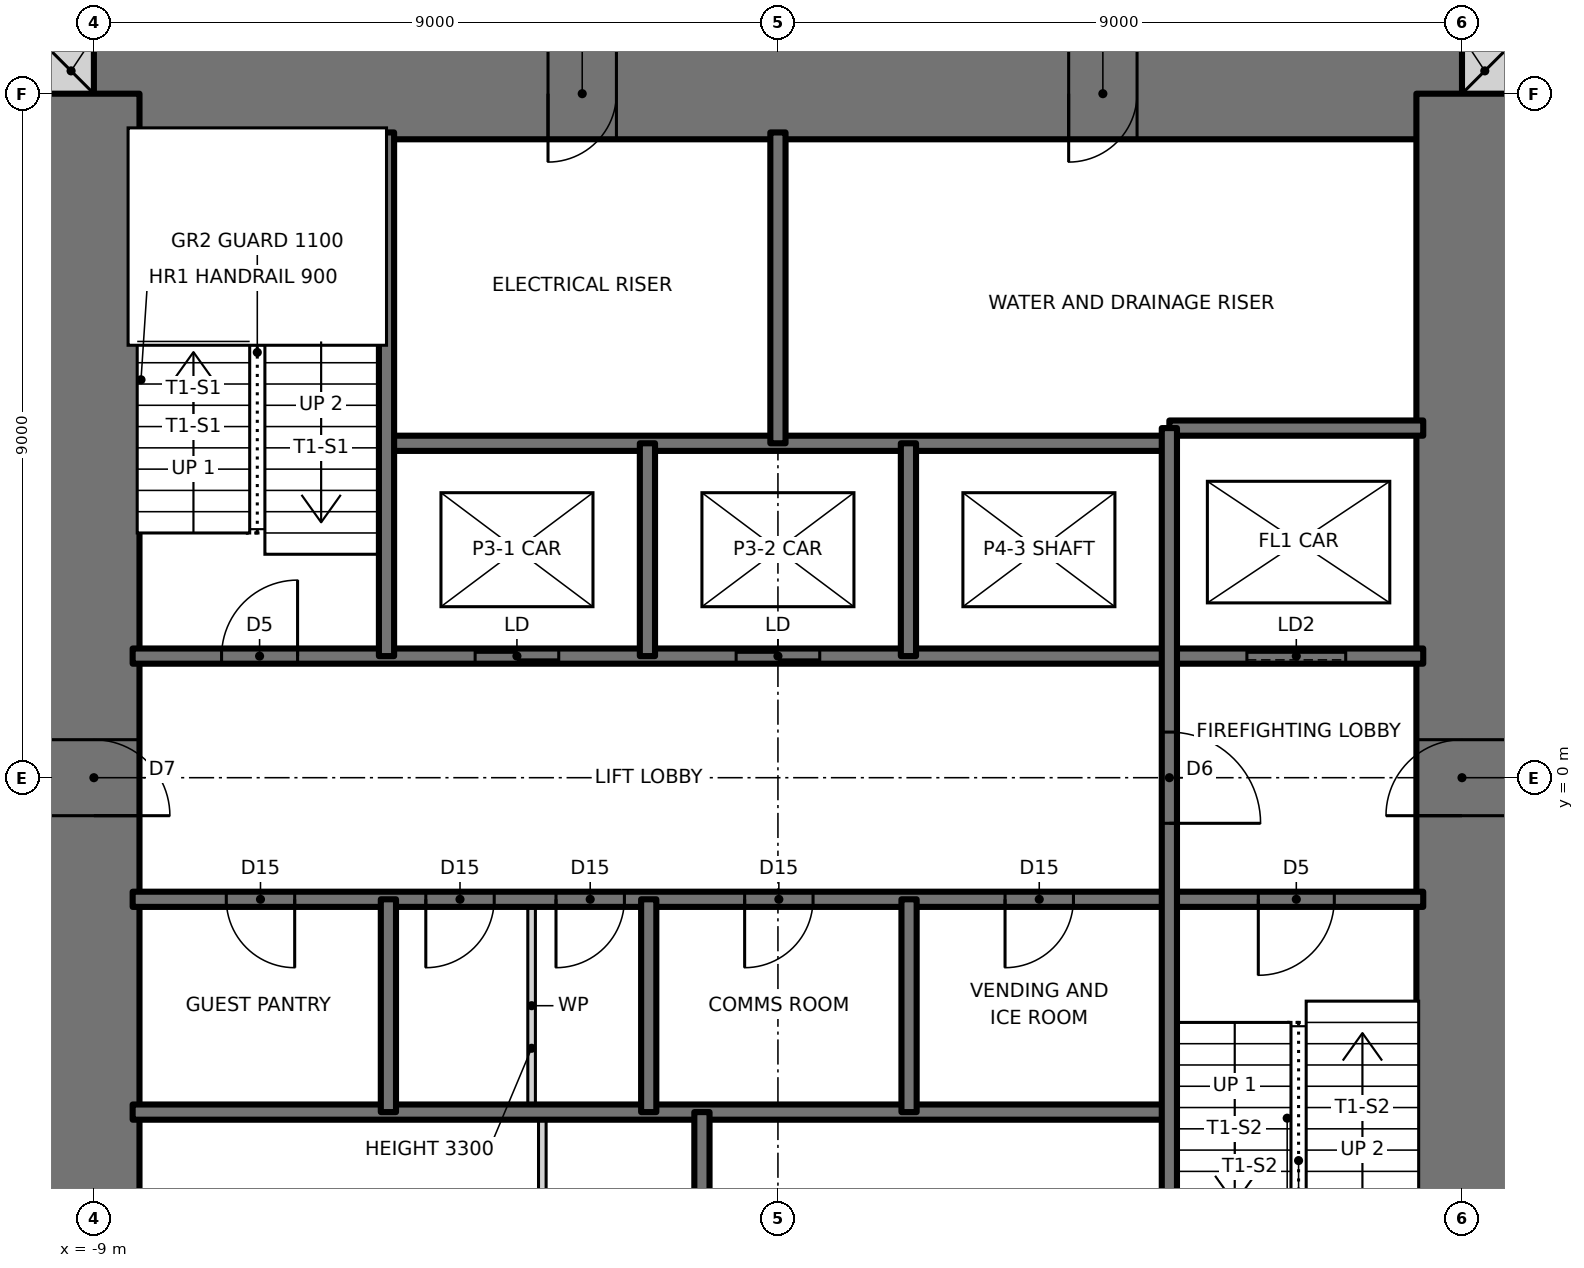
"""IFC4 building model, lengths in metres.
Left out: names, types, materials, properties, quantities, classifications, styles, units other than length and angle.
Written with IfcOpenShell. Run it as: python <this file> out.ifc"""

import sys

from ifc_helpers import new_model, si_unit, direction, frame, frame_2d, origin, place, context, subcontext, project, spatial, rectangle, extrude, element, fill, save


model = new_model("IFC4")
c1 = context("Model", 3, precision=1e-05, world=origin(), true_north=direction((0.0, 1.0)))
c2 = subcontext(c1, "Body", "Model", "MODEL_VIEW")
j1 = project(units=[si_unit("LENGTHUNIT", "METRE"), si_unit("PLANEANGLEUNIT", "RADIAN")], contexts=[c1])
p1 = place(None, origin())
s1 = spatial("IfcSite", under=j1, at=p1, CompositionType="ELEMENT")
p2 = place(p1, origin())
s2 = spatial("IfcBuilding", under=s1, at=p2, CompositionType="ELEMENT")
p3 = place(p2, frame((0.0, 0.0, 205.5)))
s3 = spatial("IfcBuildingStorey", under=s2, at=p3, CompositionType="ELEMENT", Elevation=205.5)
for number, where, z_axis, x_axis in (
    (1, (9.0, 9.3, 0.0), (0.0, 0.0, 1.0), (1.0, 0.0, 0.0)),
    (2, (-9.6, 9.3, 0.0), (0.0, 0.0, 1.0), (1.0, 0.0, 0.0)),
):
    element("IfcWall", number, at=place(p3, frame(where, z_axis=z_axis, x_axis=x_axis)), inside=s3, PredefinedType="SOLIDWALL", context=c2, shape_type="SweptSolid", body=[
        extrude(rectangle(XDim=0.6, YDim=0.6, at=frame_2d((0.3, 0.0))), origin(), (0.0, 0.0, 1.0), 3.5),
    ])
p4 = place(p3, frame((9.0, 9.0, 0.0), z_axis=(0.0, 0.0, 1.0), x_axis=(-1.0, 0.0, 0.0)))
e3 = element("IfcWall", 3, at=p4, inside=s3, PredefinedType="SHEAR", context=c2, shape_type="SweptSolid", body=[
    extrude(rectangle(XDim=18.0, YDim=1.2, at=frame_2d((9.0, 0.0))), origin(), (0.0, 0.0, 1.0), 3.5),
])
p5 = place(p4, frame((11.125, 0.0, 0.0)))
e4 = element("IfcOpeningElement", 4, at=p5, cuts=e3, PredefinedType="OPENING", context=c2, shape_type="SweptSolid", body=[
    extrude(rectangle(XDim=0.9, YDim=2.1, at=frame_2d((0.45, 1.05))), frame((0.0, 0.61, 0.0), z_axis=(0.0, -1.0, 0.0), x_axis=(1.0, 0.0, 0.0)), (0.0, 0.0, 1.0), 1.22),
])
p6 = place(p4, frame((4.275, 0.0, 0.0)))
e5 = element("IfcOpeningElement", 5, at=p6, cuts=e3, PredefinedType="OPENING", context=c2, shape_type="SweptSolid", body=[
    extrude(rectangle(XDim=0.9, YDim=2.1, at=frame_2d((0.45, 1.05))), frame((0.0, 0.61, 0.0), z_axis=(0.0, -1.0, 0.0), x_axis=(1.0, 0.0, 0.0)), (0.0, 0.0, 1.0), 1.22),
])
p7 = place(p3, frame((9.0, -9.0, 0.0), z_axis=(0.0, 0.0, 1.0), x_axis=(0.0, 1.0, 0.0)))
e6 = element("IfcWall", 6, at=p7, inside=s3, PredefinedType="SHEAR", context=c2, shape_type="SweptSolid", body=[
    extrude(rectangle(XDim=18.0, YDim=1.2, at=frame_2d((9.0, 0.0))), origin(), (0.0, 0.0, 1.0), 3.5),
])
p8 = place(p7, frame((8.5, 0.0, 0.0)))
e7 = element("IfcOpeningElement", 7, at=p8, cuts=e6, PredefinedType="OPENING", context=c2, shape_type="SweptSolid", body=[
    extrude(rectangle(XDim=1.0, YDim=2.1, at=frame_2d((0.5, 1.05))), frame((0.0, 0.61, 0.0), z_axis=(0.0, -1.0, 0.0), x_axis=(1.0, 0.0, 0.0)), (0.0, 0.0, 1.0), 1.22),
])
p9 = place(p3, frame((-9.0, 9.0, 0.0), z_axis=(0.0, 0.0, 1.0), x_axis=(0.0, -1.0, 0.0)))
e8 = element("IfcWall", 8, at=p9, inside=s3, PredefinedType="SHEAR", context=c2, shape_type="SweptSolid", body=[
    extrude(rectangle(XDim=18.0, YDim=1.2, at=frame_2d((9.0, 0.0))), origin(), (0.0, 0.0, 1.0), 3.5),
])
p10 = place(p9, frame((8.5, 0.0, 0.0)))
e9 = element("IfcOpeningElement", 9, at=p10, cuts=e8, PredefinedType="OPENING", context=c2, shape_type="SweptSolid", body=[
    extrude(rectangle(XDim=1.0, YDim=2.1, at=frame_2d((0.5, 1.05))), frame((0.0, 0.61, 0.0), z_axis=(0.0, -1.0, 0.0), x_axis=(1.0, 0.0, 0.0)), (0.0, 0.0, 1.0), 1.22),
])
p11 = place(p3, frame((-8.49, -4.4, 0.0), z_axis=(0.0, 0.0, 1.0), x_axis=(1.0, 0.0, 0.0)))
e10 = element("IfcWall", 10, at=p11, inside=s3, PredefinedType="SOLIDWALL", context=c2, shape_type="SweptSolid", body=[
    extrude(rectangle(XDim=13.64, YDim=0.2, at=frame_2d((6.82, 0.0))), origin(), (0.0, 0.0, 1.0), 3.5),
])
p12 = place(p3, frame((-8.49, -1.6, 0.0), z_axis=(0.0, 0.0, 1.0), x_axis=(1.0, 0.0, 0.0)))
e11 = element("IfcWall", 11, at=p12, inside=s3, PredefinedType="SOLIDWALL", context=c2, shape_type="SweptSolid", body=[
    extrude(rectangle(XDim=16.98, YDim=0.2, at=frame_2d((8.49, 0.0))), origin(), (0.0, 0.0, 1.0), 3.5),
])
p13 = place(p12, frame((14.81, 0.0, 0.0)))
e12 = element("IfcOpeningElement", 12, at=p13, cuts=e11, PredefinedType="OPENING", context=c2, shape_type="SweptSolid", body=[
    extrude(rectangle(XDim=1.0, YDim=2.1, at=frame_2d((0.5, 1.05))), frame((0.0, 0.11, 0.0), z_axis=(0.0, -1.0, 0.0), x_axis=(1.0, 0.0, 0.0)), (0.0, 0.0, 1.0), 0.22),
])
p14 = place(p12, frame((1.232, 0.0, 0.0)))
e13 = element("IfcOpeningElement", 13, at=p14, cuts=e11, PredefinedType="OPENING", context=c2, shape_type="SweptSolid", body=[
    extrude(rectangle(XDim=0.9, YDim=2.1, at=frame_2d((0.45, 1.05))), frame((0.0, 0.11, 0.0), z_axis=(0.0, -1.0, 0.0), x_axis=(1.0, 0.0, 0.0)), (0.0, 0.0, 1.0), 0.22),
])
p15 = place(p12, frame((5.57, 0.0, 0.0)))
e14 = element("IfcOpeningElement", 14, at=p15, cuts=e11, PredefinedType="OPENING", context=c2, shape_type="SweptSolid", body=[
    extrude(rectangle(XDim=0.9, YDim=2.1, at=frame_2d((0.45, 1.05))), frame((0.0, 0.11, 0.0), z_axis=(0.0, -1.0, 0.0), x_axis=(1.0, 0.0, 0.0)), (0.0, 0.0, 1.0), 0.22),
])
p16 = place(p12, frame((3.857, 0.0, 0.0)))
e15 = element("IfcOpeningElement", 15, at=p16, cuts=e11, PredefinedType="OPENING", context=c2, shape_type="SweptSolid", body=[
    extrude(rectangle(XDim=0.9, YDim=2.1, at=frame_2d((0.45, 1.05))), frame((0.0, 0.11, 0.0), z_axis=(0.0, -1.0, 0.0), x_axis=(1.0, 0.0, 0.0)), (0.0, 0.0, 1.0), 0.22),
])
p17 = place(p12, frame((8.052, 0.0, 0.0)))
e16 = element("IfcOpeningElement", 16, at=p17, cuts=e11, PredefinedType="OPENING", context=c2, shape_type="SweptSolid", body=[
    extrude(rectangle(XDim=0.9, YDim=2.1, at=frame_2d((0.45, 1.05))), frame((0.0, 0.11, 0.0), z_axis=(0.0, -1.0, 0.0), x_axis=(1.0, 0.0, 0.0)), (0.0, 0.0, 1.0), 0.22),
])
p18 = place(p12, frame((11.478, 0.0, 0.0)))
e17 = element("IfcOpeningElement", 17, at=p18, cuts=e11, PredefinedType="OPENING", context=c2, shape_type="SweptSolid", body=[
    extrude(rectangle(XDim=0.9, YDim=2.1, at=frame_2d((0.45, 1.05))), frame((0.0, 0.11, 0.0), z_axis=(0.0, -1.0, 0.0), x_axis=(1.0, 0.0, 0.0)), (0.0, 0.0, 1.0), 0.22),
])
p19 = place(p3, frame((-8.49, 1.6, 0.0), z_axis=(0.0, 0.0, 1.0), x_axis=(1.0, 0.0, 0.0)))
e18 = element("IfcWall", 18, at=p19, inside=s3, PredefinedType="SOLIDWALL", context=c2, shape_type="SweptSolid", body=[
    extrude(rectangle(XDim=16.98, YDim=0.2, at=frame_2d((8.49, 0.0))), origin(), (0.0, 0.0, 1.0), 3.5),
])
p20 = place(p19, frame((1.17, 0.0, 0.0)))
e19 = element("IfcOpeningElement", 19, at=p20, cuts=e18, PredefinedType="OPENING", context=c2, shape_type="SweptSolid", body=[
    extrude(rectangle(XDim=1.0, YDim=2.1, at=frame_2d((0.5, 1.05))), frame((0.0, 0.11, 0.0), z_axis=(0.0, -1.0, 0.0), x_axis=(1.0, 0.0, 0.0)), (0.0, 0.0, 1.0), 0.22),
])
p21 = place(p19, frame((4.506, 0.0, 0.0)))
e20 = element("IfcOpeningElement", 20, at=p21, cuts=e18, PredefinedType="OPENING", context=c2, shape_type="SweptSolid", body=[
    extrude(rectangle(XDim=1.1, YDim=2.1, at=frame_2d((0.55, 1.05))), frame((0.0, 0.11, 0.0), z_axis=(0.0, -1.0, 0.0), x_axis=(1.0, 0.0, 0.0)), (0.0, 0.0, 1.0), 0.22),
])
p22 = place(p19, frame((7.94, 0.0, 0.0)))
e21 = element("IfcOpeningElement", 21, at=p22, cuts=e18, PredefinedType="OPENING", context=c2, shape_type="SweptSolid", body=[
    extrude(rectangle(XDim=1.1, YDim=2.1, at=frame_2d((0.55, 1.05))), frame((0.0, 0.11, 0.0), z_axis=(0.0, -1.0, 0.0), x_axis=(1.0, 0.0, 0.0)), (0.0, 0.0, 1.0), 0.22),
])
p23 = place(p19, frame((14.66, 0.0, 0.0)))
e22 = element("IfcOpeningElement", 22, at=p23, cuts=e18, PredefinedType="OPENING", context=c2, shape_type="SweptSolid", body=[
    extrude(rectangle(XDim=1.3, YDim=2.1, at=frame_2d((0.65, 1.05))), frame((0.0, 0.11, 0.0), z_axis=(0.0, -1.0, 0.0), x_axis=(1.0, 0.0, 0.0)), (0.0, 0.0, 1.0), 0.22),
])
p24 = place(p3, frame((-5.15, 4.4, 0.0), z_axis=(0.0, 0.0, 1.0), x_axis=(1.0, 0.0, 0.0)))
e23 = element("IfcWall", 23, at=p24, inside=s3, PredefinedType="SOLIDWALL", context=c2, shape_type="SweptSolid", body=[
    extrude(rectangle(XDim=10.3, YDim=0.2, at=frame_2d((5.15, 0.0))), origin(), (0.0, 0.0, 1.0), 3.5),
])
p25 = place(p3, frame((5.15, 4.6, 0.0), z_axis=(0.0, 0.0, 1.0), x_axis=(1.0, 0.0, 0.0)))
e24 = element("IfcWall", 24, at=p25, inside=s3, PredefinedType="SOLIDWALL", context=c2, shape_type="SweptSolid", body=[
    extrude(rectangle(XDim=3.34, YDim=0.2, at=frame_2d((1.67, 0.0))), origin(), (0.0, 0.0, 1.0), 3.5),
])
p26 = place(p3, frame((5.15, -8.49, 0.0), z_axis=(0.0, 0.0, 1.0), x_axis=(0.0, 1.0, 0.0)))
e25 = element("IfcWall", 25, at=p26, inside=s3, PredefinedType="SOLIDWALL", context=c2, shape_type="SweptSolid", body=[
    extrude(rectangle(XDim=13.09, YDim=0.2, at=frame_2d((6.545, 0.0))), origin(), (0.0, 0.0, 1.0), 3.5),
])
p27 = place(p26, frame((7.89, 0.0, 0.0)))
e26 = element("IfcOpeningElement", 26, at=p27, cuts=e25, PredefinedType="OPENING", context=c2, shape_type="SweptSolid", body=[
    extrude(rectangle(XDim=1.2, YDim=2.1, at=frame_2d((0.6, 1.05))), frame((0.0, 0.11, 0.0), z_axis=(0.0, -1.0, 0.0), x_axis=(1.0, 0.0, 0.0)), (0.0, 0.0, 1.0), 0.22),
])
for number, where, z_axis, x_axis in (
    (27, (1.725, -4.4, 0.0), (0.0, 0.0, 1.0), (0.0, 1.0, 0.0)),
    (28, (1.717, 1.6, 0.0), (0.0, 0.0, 1.0), (0.0, 1.0, 0.0)),
):
    element("IfcWall", number, at=place(p3, frame(where, z_axis=z_axis, x_axis=x_axis)), inside=s3, PredefinedType="SOLIDWALL", context=c2, shape_type="SweptSolid", body=[
        extrude(rectangle(XDim=2.8, YDim=0.2, at=frame_2d((1.4, 0.0))), origin(), (0.0, 0.0, 1.0), 3.5),
    ])
for number, where, z_axis, x_axis in (
    (29, (0.0, 4.4, 0.0), (0.0, 0.0, 1.0), (0.0, 1.0, 0.0)),
    (30, (-1.0, -8.49, 0.0), (0.0, 0.0, 1.0), (0.0, 1.0, 0.0)),
):
    element("IfcWall", number, at=place(p3, frame(where, z_axis=z_axis, x_axis=x_axis)), inside=s3, PredefinedType="SOLIDWALL", context=c2, shape_type="SweptSolid", body=[
        extrude(rectangle(XDim=4.09, YDim=0.2, at=frame_2d((2.045, 0.0))), origin(), (0.0, 0.0, 1.0), 3.5),
    ])
for number, where, z_axis, x_axis in (
    (31, (-1.7, -4.4, 0.0), (0.0, 0.0, 1.0), (0.0, 1.0, 0.0)),
    (32, (-1.717, 1.6, 0.0), (0.0, 0.0, 1.0), (0.0, 1.0, 0.0)),
):
    element("IfcWall", number, at=place(p3, frame(where, z_axis=z_axis, x_axis=x_axis)), inside=s3, PredefinedType="SOLIDWALL", context=c2, shape_type="SweptSolid", body=[
        extrude(rectangle(XDim=2.8, YDim=0.2, at=frame_2d((1.4, 0.0))), origin(), (0.0, 0.0, 1.0), 3.5),
    ])
p28 = place(p3, frame((-3.1, -8.49, 0.0), z_axis=(0.0, 0.0, 1.0), x_axis=(0.0, 1.0, 0.0)))
e33 = element("IfcWall", 33, at=p28, inside=s3, PredefinedType="PARTITIONING", context=c2, shape_type="SweptSolid", body=[
    extrude(rectangle(XDim=4.09, YDim=0.1, at=frame_2d((2.045, 0.0))), origin(), (0.0, 0.0, 1.0), 3.3),
])
p29 = place(p28, frame((1.595, 0.0, 0.0)))
e34 = element("IfcOpeningElement", 34, at=p29, cuts=e33, PredefinedType="OPENING", context=c2, shape_type="SweptSolid", body=[
    extrude(rectangle(XDim=0.9, YDim=2.1, at=frame_2d((0.45, 1.05))), frame((0.0, 0.06, 0.0), z_axis=(0.0, -1.0, 0.0), x_axis=(1.0, 0.0, 0.0)), (0.0, 0.0, 1.0), 0.12),
])
p30 = place(p3, frame((-3.241, -4.4, 0.0), z_axis=(0.0, 0.0, 1.0), x_axis=(0.0, 1.0, 0.0)))
e35 = element("IfcWall", 35, at=p30, inside=s3, PredefinedType="PARTITIONING", context=c2, shape_type="SweptSolid", body=[
    extrude(rectangle(XDim=2.8, YDim=0.1, at=frame_2d((1.4, 0.0))), origin(), (0.0, 0.0, 1.0), 3.3),
])
p31 = place(p3, frame((-5.125, -4.4, 0.0), z_axis=(0.0, 0.0, 1.0), x_axis=(0.0, 1.0, 0.0)))
e36 = element("IfcWall", 36, at=p31, inside=s3, PredefinedType="SOLIDWALL", context=c2, shape_type="SweptSolid", body=[
    extrude(rectangle(XDim=2.8, YDim=0.2, at=frame_2d((1.4, 0.0))), origin(), (0.0, 0.0, 1.0), 3.5),
])
p32 = place(p3, frame((-5.15, 1.6, 0.0), z_axis=(0.0, 0.0, 1.0), x_axis=(0.0, 1.0, 0.0)))
e37 = element("IfcWall", 37, at=p32, inside=s3, PredefinedType="SOLIDWALL", context=c2, shape_type="SweptSolid", body=[
    extrude(rectangle(XDim=6.89, YDim=0.2, at=frame_2d((3.445, 0.0))), origin(), (0.0, 0.0, 1.0), 3.5),
])
p33 = place(p20, origin())
e38 = element("IfcDoor", 38, at=p33, inside=s3, OperationType="SINGLE_SWING_RIGHT", PredefinedType="DOOR", context=c2, shape_type="SweptSolid", body=[
    extrude(rectangle(XDim=1.0, YDim=2.1, at=frame_2d((0.5, 1.05))), frame((0.0, 0.025, 0.0), z_axis=(0.0, -1.0, 0.0), x_axis=(1.0, 0.0, 0.0)), (0.0, 0.0, 1.0), 0.05),
])
fill(e19, e38)
p34 = place(p13, frame((1.0, 0.0, 0.0), z_axis=(0.0, 0.0, 1.0), x_axis=(-1.0, 0.0, 0.0)))
e39 = element("IfcDoor", 39, at=p34, inside=s3, OperationType="SINGLE_SWING_RIGHT", PredefinedType="DOOR", context=c2, shape_type="SweptSolid", body=[
    extrude(rectangle(XDim=1.0, YDim=2.1, at=frame_2d((0.5, 1.05))), frame((0.0, 0.025, 0.0), z_axis=(0.0, -1.0, 0.0), x_axis=(1.0, 0.0, 0.0)), (0.0, 0.0, 1.0), 0.05),
])
fill(e12, e39)
p35 = place(p27, frame((1.2, 0.0, 0.0), z_axis=(0.0, 0.0, 1.0), x_axis=(-1.0, 0.0, 0.0)))
e40 = element("IfcDoor", 40, at=p35, inside=s3, OperationType="SINGLE_SWING_RIGHT", PredefinedType="DOOR", context=c2, shape_type="SweptSolid", body=[
    extrude(rectangle(XDim=1.2, YDim=2.1, at=frame_2d((0.6, 1.05))), frame((0.0, 0.025, 0.0), z_axis=(0.0, -1.0, 0.0), x_axis=(1.0, 0.0, 0.0)), (0.0, 0.0, 1.0), 0.05),
])
fill(e26, e40)
p36 = place(p14, frame((0.9, 0.0, 0.0), z_axis=(0.0, 0.0, 1.0), x_axis=(-1.0, 0.0, 0.0)))
e41 = element("IfcDoor", 41, at=p36, inside=s3, OperationType="SINGLE_SWING_LEFT", PredefinedType="DOOR", context=c2, shape_type="SweptSolid", body=[
    extrude(rectangle(XDim=0.9, YDim=2.1, at=frame_2d((0.45, 1.05))), frame((0.0, 0.025, 0.0), z_axis=(0.0, -1.0, 0.0), x_axis=(1.0, 0.0, 0.0)), (0.0, 0.0, 1.0), 0.05),
])
fill(e13, e41)
p37 = place(p15, frame((0.9, 0.0, 0.0), z_axis=(0.0, 0.0, 1.0), x_axis=(-1.0, 0.0, 0.0)))
e42 = element("IfcDoor", 42, at=p37, inside=s3, OperationType="SINGLE_SWING_RIGHT", PredefinedType="DOOR", context=c2, shape_type="SweptSolid", body=[
    extrude(rectangle(XDim=0.9, YDim=2.1, at=frame_2d((0.45, 1.05))), frame((0.0, 0.025, 0.0), z_axis=(0.0, -1.0, 0.0), x_axis=(1.0, 0.0, 0.0)), (0.0, 0.0, 1.0), 0.05),
])
fill(e14, e42)
p38 = place(p16, frame((0.9, 0.0, 0.0), z_axis=(0.0, 0.0, 1.0), x_axis=(-1.0, 0.0, 0.0)))
e43 = element("IfcDoor", 43, at=p38, inside=s3, OperationType="SINGLE_SWING_RIGHT", PredefinedType="DOOR", context=c2, shape_type="SweptSolid", body=[
    extrude(rectangle(XDim=0.9, YDim=2.1, at=frame_2d((0.45, 1.05))), frame((0.0, 0.025, 0.0), z_axis=(0.0, -1.0, 0.0), x_axis=(1.0, 0.0, 0.0)), (0.0, 0.0, 1.0), 0.05),
])
fill(e15, e43)
p39 = place(p17, frame((0.9, 0.0, 0.0), z_axis=(0.0, 0.0, 1.0), x_axis=(-1.0, 0.0, 0.0)))
e44 = element("IfcDoor", 44, at=p39, inside=s3, OperationType="SINGLE_SWING_RIGHT", PredefinedType="DOOR", context=c2, shape_type="SweptSolid", body=[
    extrude(rectangle(XDim=0.9, YDim=2.1, at=frame_2d((0.45, 1.05))), frame((0.0, 0.025, 0.0), z_axis=(0.0, -1.0, 0.0), x_axis=(1.0, 0.0, 0.0)), (0.0, 0.0, 1.0), 0.05),
])
fill(e16, e44)
p40 = place(p18, frame((0.9, 0.0, 0.0), z_axis=(0.0, 0.0, 1.0), x_axis=(-1.0, 0.0, 0.0)))
e45 = element("IfcDoor", 45, at=p40, inside=s3, OperationType="SINGLE_SWING_RIGHT", PredefinedType="DOOR", context=c2, shape_type="SweptSolid", body=[
    extrude(rectangle(XDim=0.9, YDim=2.1, at=frame_2d((0.45, 1.05))), frame((0.0, 0.025, 0.0), z_axis=(0.0, -1.0, 0.0), x_axis=(1.0, 0.0, 0.0)), (0.0, 0.0, 1.0), 0.05),
])
fill(e17, e45)
p41 = place(p10, origin())
e46 = element("IfcDoor", 46, at=p41, inside=s3, OperationType="SINGLE_SWING_RIGHT", PredefinedType="DOOR", context=c2, shape_type="SweptSolid", body=[
    extrude(rectangle(XDim=1.0, YDim=2.1, at=frame_2d((0.5, 1.05))), frame((0.0, 0.025, 0.0), z_axis=(0.0, -1.0, 0.0), x_axis=(1.0, 0.0, 0.0)), (0.0, 0.0, 1.0), 0.05),
])
fill(e9, e46)
p42 = place(p8, origin())
e47 = element("IfcDoor", 47, at=p42, inside=s3, OperationType="SINGLE_SWING_LEFT", PredefinedType="DOOR", context=c2, shape_type="SweptSolid", body=[
    extrude(rectangle(XDim=1.0, YDim=2.1, at=frame_2d((0.5, 1.05))), frame((0.0, 0.025, 0.0), z_axis=(0.0, -1.0, 0.0), x_axis=(1.0, 0.0, 0.0)), (0.0, 0.0, 1.0), 0.05),
])
fill(e7, e47)
p43 = place(p5, origin())
e48 = element("IfcDoor", 48, at=p43, inside=s3, OperationType="SINGLE_SWING_RIGHT", PredefinedType="DOOR", context=c2, shape_type="SweptSolid", body=[
    extrude(rectangle(XDim=0.9, YDim=2.1, at=frame_2d((0.45, 1.05))), frame((0.0, 0.025, 0.0), z_axis=(0.0, -1.0, 0.0), x_axis=(1.0, 0.0, 0.0)), (0.0, 0.0, 1.0), 0.05),
])
fill(e4, e48)
p44 = place(p6, origin())
e49 = element("IfcDoor", 49, at=p44, inside=s3, OperationType="SINGLE_SWING_RIGHT", PredefinedType="DOOR", context=c2, shape_type="SweptSolid", body=[
    extrude(rectangle(XDim=0.9, YDim=2.1, at=frame_2d((0.45, 1.05))), frame((0.0, 0.025, 0.0), z_axis=(0.0, -1.0, 0.0), x_axis=(1.0, 0.0, 0.0)), (0.0, 0.0, 1.0), 0.05),
])
fill(e5, e49)
p45 = place(p21, origin())
e50 = element("IfcDoor", 50, at=p45, inside=s3, OperationType="DOUBLE_DOOR_SLIDING", PredefinedType="DOOR", context=c2, shape_type="SweptSolid", body=[
    extrude(rectangle(XDim=1.1, YDim=2.1, at=frame_2d((0.55, 1.05))), frame((0.0, 0.025, 0.0), z_axis=(0.0, -1.0, 0.0), x_axis=(1.0, 0.0, 0.0)), (0.0, 0.0, 1.0), 0.05),
])
fill(e20, e50)
p46 = place(p22, origin())
e51 = element("IfcDoor", 51, at=p46, inside=s3, OperationType="DOUBLE_DOOR_SLIDING", PredefinedType="DOOR", context=c2, shape_type="SweptSolid", body=[
    extrude(rectangle(XDim=1.1, YDim=2.1, at=frame_2d((0.55, 1.05))), frame((0.0, 0.025, 0.0), z_axis=(0.0, -1.0, 0.0), x_axis=(1.0, 0.0, 0.0)), (0.0, 0.0, 1.0), 0.05),
])
fill(e21, e51)
p47 = place(p23, origin())
e52 = element("IfcDoor", 52, at=p47, inside=s3, OperationType="SLIDING_TO_LEFT", PredefinedType="DOOR", context=c2, shape_type="SweptSolid", body=[
    extrude(rectangle(XDim=1.3, YDim=2.1, at=frame_2d((0.65, 1.05))), frame((0.0, 0.025, 0.0), z_axis=(0.0, -1.0, 0.0), x_axis=(1.0, 0.0, 0.0)), (0.0, 0.0, 1.0), 0.05),
])
fill(e22, e52)
save(model, sys.argv[1])
